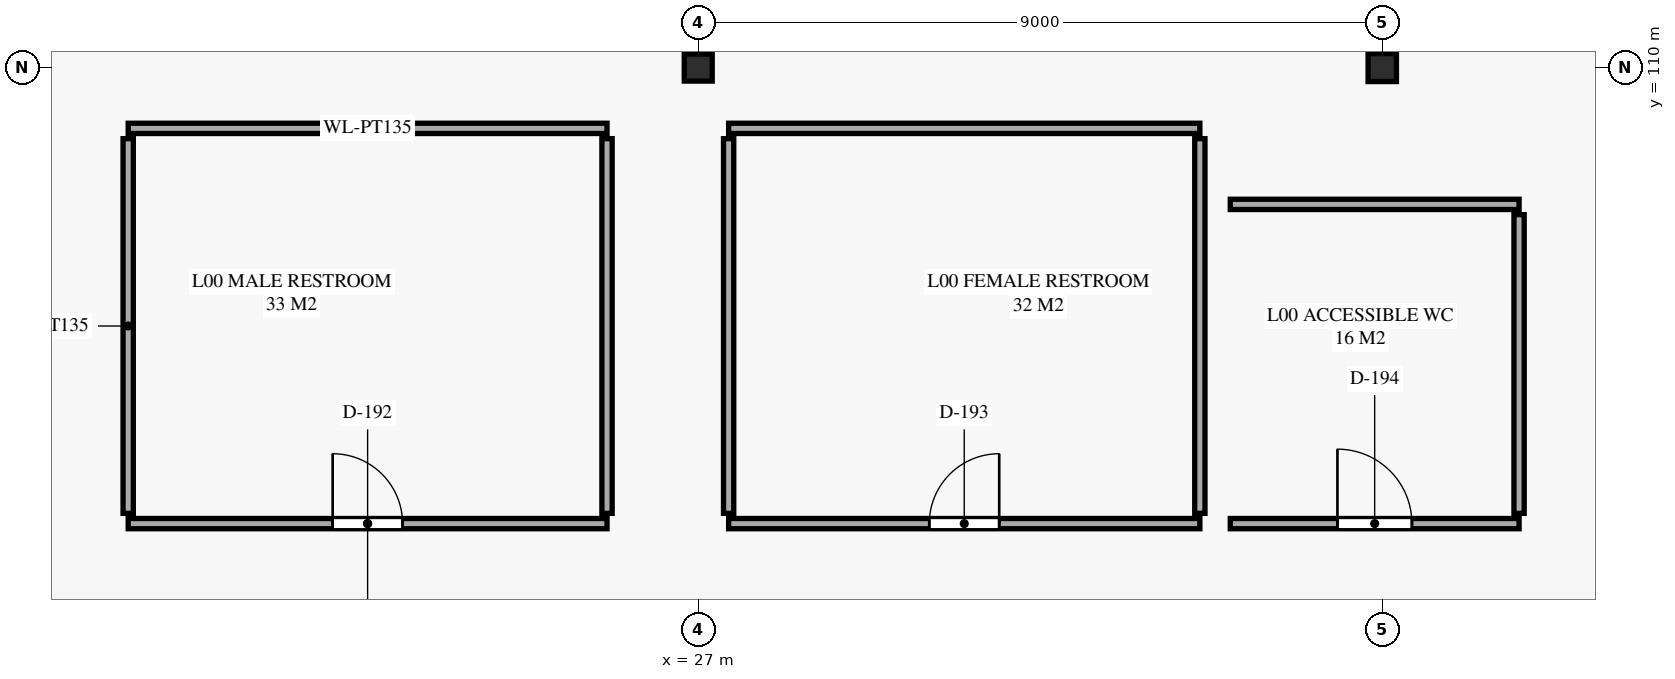
"""IFC4 building model, lengths in metres.
Left out: names, types, materials, properties, quantities, classifications, styles, units other than length and angle.
Written with IfcOpenShell. Run it as: python <this file> out.ifc"""

import sys

from ifc_helpers import new_model, si_unit, direction, frame, frame_2d, origin, origin_2d, place, context, subcontext, project, spatial, rectangle, i_section, extrude, element, fill, save


model = new_model("IFC4")
c1 = context("Model", 3, precision=1e-05, world=origin(), true_north=direction((0.0, 1.0)))
c2 = subcontext(c1, "Body", "Model", "MODEL_VIEW")
j1 = project(units=[si_unit("LENGTHUNIT", "METRE"), si_unit("PLANEANGLEUNIT", "RADIAN")], contexts=[c1])
p1 = place(None, origin())
s1 = spatial("IfcSite", under=j1, at=p1, CompositionType="ELEMENT")
p2 = place(p1, origin())
s2 = spatial("IfcBuilding", under=s1, at=p2, CompositionType="ELEMENT")
p3 = place(p2, origin())
s3 = spatial("IfcBuildingStorey", under=s2, at=p3, CompositionType="ELEMENT", Elevation=0.0)
p4 = place(p3, frame((27.0, 110.0, 0.0), z_axis=(0.0, 0.0, 1.0), x_axis=(1.0, 0.0, 0.0)))
e1 = element("IfcColumn", 1, at=p4, inside=s3, PredefinedType="COLUMN", context=c2, shape_type="SweptSolid", body=[
    extrude(i_section(OverallWidth=0.368, OverallDepth=0.356, WebThickness=0.011, FlangeThickness=0.018, FilletRadius=0.015, at=origin_2d()), origin(), (0.0, 0.0, 1.0), 5.0),
])
p5 = place(p3, frame((36.0, 110.0, 0.0), z_axis=(0.0, 0.0, 1.0), x_axis=(1.0, 0.0, 0.0)))
e2 = element("IfcColumn", 2, at=p5, inside=s3, PredefinedType="COLUMN", context=c2, shape_type="SweptSolid", body=[
    extrude(i_section(OverallWidth=0.373, OverallDepth=0.368, WebThickness=0.015, FlangeThickness=0.024, FilletRadius=0.015, at=origin_2d()), origin(), (0.0, 0.0, 1.0), 5.0),
])
p6 = place(p3, frame((19.5, 104.0, 0.0), z_axis=(0.0, 0.0, 1.0), x_axis=(1.0, 0.0, 0.0)))
e3 = element("IfcWall", 3, at=p6, inside=s3, PredefinedType="PARTITIONING", context=c2, shape_type="SweptSolid", body=[
    extrude(rectangle(XDim=6.3, YDim=0.135, at=frame_2d((3.15, 0.0))), origin(), (0.0, 0.0, 1.0), 4.72),
])
p7 = place(p6, frame((2.69, 0.0, 0.0)))
e4 = element("IfcOpeningElement", 4, at=p7, cuts=e3, PredefinedType="OPENING", context=c2, shape_type="SweptSolid", body=[
    extrude(rectangle(XDim=0.92, YDim=2.1, at=frame_2d((0.46, 1.05))), frame((0.0, 0.078, 0.0), z_axis=(0.0, -1.0, 0.0), x_axis=(1.0, 0.0, 0.0)), (0.0, 0.0, 1.0), 0.155),
])
p8 = place(p3, frame((25.8, 109.2, 0.0), z_axis=(0.0, 0.0, 1.0), x_axis=(-1.0, 0.0, 0.0)))
e5 = element("IfcWall", 5, at=p8, inside=s3, PredefinedType="PARTITIONING", context=c2, shape_type="SweptSolid", body=[
    extrude(rectangle(XDim=6.3, YDim=0.135, at=frame_2d((3.15, 0.0))), origin(), (0.0, 0.0, 1.0), 4.72),
])
for number, where, z_axis, x_axis in (
    (6, (19.5, 109.065, 0.0), (0.0, 0.0, 1.0), (0.0, -1.0, 0.0)),
    (7, (25.8, 104.135, 0.0), (0.0, 0.0, 1.0), (0.0, 1.0, 0.0)),
):
    element("IfcWall", number, at=place(p3, frame(where, z_axis=z_axis, x_axis=x_axis)), inside=s3, PredefinedType="PARTITIONING", context=c2, shape_type="SweptSolid", body=[
        extrude(rectangle(XDim=4.93, YDim=0.135, at=frame_2d((2.465, 0.0))), origin(), (0.0, 0.0, 1.0), 4.72),
    ])
p9 = place(p3, frame((27.4, 104.0, 0.0), z_axis=(0.0, 0.0, 1.0), x_axis=(1.0, 0.0, 0.0)))
e8 = element("IfcWall", 8, at=p9, inside=s3, PredefinedType="PARTITIONING", context=c2, shape_type="SweptSolid", body=[
    extrude(rectangle(XDim=6.2, YDim=0.135, at=frame_2d((3.1, 0.0))), origin(), (0.0, 0.0, 1.0), 4.72),
])
p10 = place(p9, frame((2.64, 0.0, 0.0)))
e9 = element("IfcOpeningElement", 9, at=p10, cuts=e8, PredefinedType="OPENING", context=c2, shape_type="SweptSolid", body=[
    extrude(rectangle(XDim=0.92, YDim=2.1, at=frame_2d((0.46, 1.05))), frame((0.0, 0.078, 0.0), z_axis=(0.0, -1.0, 0.0), x_axis=(1.0, 0.0, 0.0)), (0.0, 0.0, 1.0), 0.155),
])
p11 = place(p3, frame((33.6, 109.2, 0.0), z_axis=(0.0, 0.0, 1.0), x_axis=(-1.0, 0.0, 0.0)))
e10 = element("IfcWall", 10, at=p11, inside=s3, PredefinedType="PARTITIONING", context=c2, shape_type="SweptSolid", body=[
    extrude(rectangle(XDim=6.2, YDim=0.135, at=frame_2d((3.1, 0.0))), origin(), (0.0, 0.0, 1.0), 4.72),
])
p12 = place(p3, frame((27.4, 109.065, 0.0), z_axis=(0.0, 0.0, 1.0), x_axis=(0.0, -1.0, 0.0)))
e11 = element("IfcWall", 11, at=p12, inside=s3, PredefinedType="PARTITIONING", context=c2, shape_type="SweptSolid", body=[
    extrude(rectangle(XDim=4.93, YDim=0.135, at=frame_2d((2.465, 0.0))), origin(), (0.0, 0.0, 1.0), 4.72),
])
p13 = place(p3, frame((33.6, 104.135, 0.0), z_axis=(0.0, 0.0, 1.0), x_axis=(0.0, 1.0, 0.0)))
e12 = element("IfcWall", 12, at=p13, inside=s3, PredefinedType="PARTITIONING", context=c2, shape_type="SweptSolid", body=[
    extrude(rectangle(XDim=4.93, YDim=0.135, at=frame_2d((2.465, 0.0))), origin(), (0.0, 0.0, 1.0), 4.306),
])
p14 = place(p3, frame((34.0, 104.0, 0.0), z_axis=(0.0, 0.0, 1.0), x_axis=(1.0, 0.0, 0.0)))
e13 = element("IfcWall", 13, at=p14, inside=s3, PredefinedType="PARTITIONING", context=c2, shape_type="SweptSolid", body=[
    extrude(rectangle(XDim=3.8, YDim=0.135, at=frame_2d((1.9, 0.0))), origin(), (0.0, 0.0, 1.0), 4.72),
])
p15 = place(p14, frame((1.41, 0.0, 0.0)))
e14 = element("IfcOpeningElement", 14, at=p15, cuts=e13, PredefinedType="OPENING", context=c2, shape_type="SweptSolid", body=[
    extrude(rectangle(XDim=0.98, YDim=2.1, at=frame_2d((0.49, 1.05))), frame((0.0, 0.078, 0.0), z_axis=(0.0, -1.0, 0.0), x_axis=(1.0, 0.0, 0.0)), (0.0, 0.0, 1.0), 0.155),
])
p16 = place(p3, frame((37.8, 108.2, 0.0), z_axis=(0.0, 0.0, 1.0), x_axis=(-1.0, 0.0, 0.0)))
e15 = element("IfcWall", 15, at=p16, inside=s3, PredefinedType="PARTITIONING", context=c2, shape_type="SweptSolid", body=[
    extrude(rectangle(XDim=3.8, YDim=0.135, at=frame_2d((1.9, 0.0))), origin(), (0.0, 0.0, 1.0), 4.72),
])
p17 = place(p3, frame((37.8, 104.135, 0.0), z_axis=(0.0, 0.0, 1.0), x_axis=(0.0, 1.0, 0.0)))
e16 = element("IfcWall", 16, at=p17, inside=s3, PredefinedType="PARTITIONING", context=c2, shape_type="SweptSolid", body=[
    extrude(rectangle(XDim=3.93, YDim=0.135, at=frame_2d((1.965, 0.0))), origin(), (0.0, 0.0, 1.0), 4.72),
])
p18 = place(p7, origin())
e17 = element("IfcDoor", 17, at=p18, inside=s3, OperationType="SINGLE_SWING_LEFT", PredefinedType="DOOR", context=c2, shape_type="SweptSolid", body=[
    extrude(rectangle(XDim=0.92, YDim=2.1, at=frame_2d((0.46, 1.05))), frame((0.0, 0.025, 0.0), z_axis=(0.0, -1.0, 0.0), x_axis=(1.0, 0.0, 0.0)), (0.0, 0.0, 1.0), 0.05),
])
fill(e4, e17)
p19 = place(p10, origin())
e18 = element("IfcDoor", 18, at=p19, inside=s3, OperationType="SINGLE_SWING_RIGHT", PredefinedType="DOOR", context=c2, shape_type="SweptSolid", body=[
    extrude(rectangle(XDim=0.92, YDim=2.1, at=frame_2d((0.46, 1.05))), frame((0.0, 0.025, 0.0), z_axis=(0.0, -1.0, 0.0), x_axis=(1.0, 0.0, 0.0)), (0.0, 0.0, 1.0), 0.05),
])
fill(e9, e18)
p20 = place(p15, origin())
e19 = element("IfcDoor", 19, at=p20, inside=s3, OperationType="SINGLE_SWING_LEFT", PredefinedType="DOOR", context=c2, shape_type="SweptSolid", body=[
    extrude(rectangle(XDim=0.98, YDim=2.1, at=frame_2d((0.49, 1.05))), frame((0.0, 0.025, 0.0), z_axis=(0.0, -1.0, 0.0), x_axis=(1.0, 0.0, 0.0)), (0.0, 0.0, 1.0), 0.05),
])
fill(e14, e19)
save(model, sys.argv[1])
